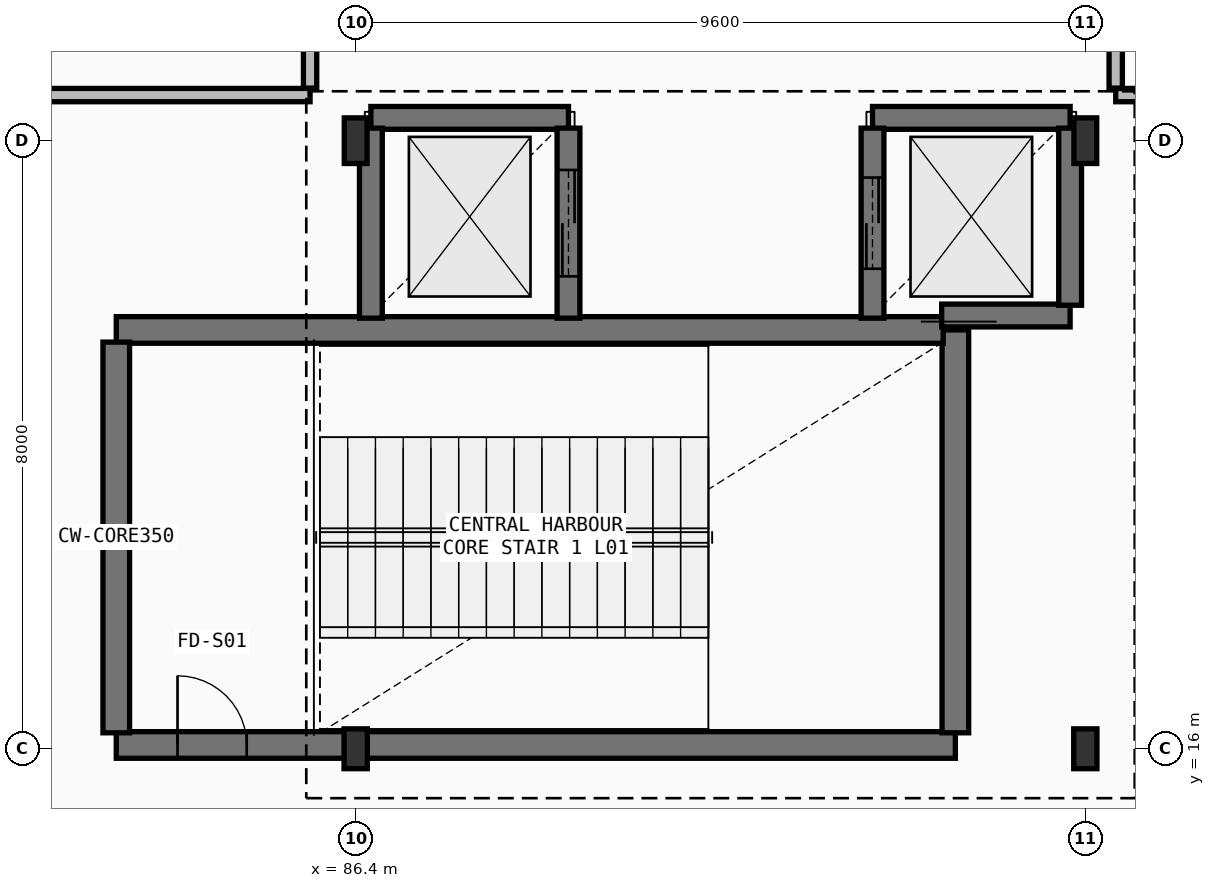
"""IFC4 building model, lengths in metres.
Left out: names, types, materials, properties, quantities, classifications, styles, units other than length and angle.
Written with IfcOpenShell. Run it as: python <this file> out.ifc"""

import sys

from ifc_helpers import new_model, si_unit, direction, frame, frame_2d, origin, origin_2d, place, context, subcontext, project, spatial, rectangle, i_section, extrude, element, fill, save


model = new_model("IFC4")
c1 = context("Model", 3, precision=1e-05, world=origin(), true_north=direction((0.0, 1.0)))
c2 = subcontext(c1, "Body", "Model", "MODEL_VIEW")
j1 = project(units=[si_unit("LENGTHUNIT", "METRE"), si_unit("PLANEANGLEUNIT", "RADIAN")], contexts=[c1])
p1 = place(None, origin())
s1 = spatial("IfcSite", under=j1, at=p1, CompositionType="ELEMENT")
p2 = place(p1, origin())
s2 = spatial("IfcBuilding", under=s1, at=p2, CompositionType="ELEMENT")
p3 = place(p2, frame((0.0, 0.0, 6.0)))
s3 = spatial("IfcBuildingStorey", under=s2, at=p3, CompositionType="ELEMENT", Elevation=6.0)
p4 = place(p3, frame((86.4, 16.0, 0.0), z_axis=(0.0, 0.0, 1.0), x_axis=(1.0, 0.0, 0.0)))
e1 = element("IfcColumn", 1, at=p4, inside=s3, PredefinedType="COLUMN", context=c2, shape_type="SweptSolid", body=[
    extrude(i_section(OverallWidth=0.306, OverallDepth=0.524, WebThickness=0.021, FlangeThickness=0.04, FilletRadius=0.027, at=origin_2d()), origin(), (0.0, 0.0, 1.0), 5.4),
])
p5 = place(p3, frame((86.4, 24.0, 0.0), z_axis=(0.0, 0.0, 1.0), x_axis=(1.0, 0.0, 0.0)))
e2 = element("IfcColumn", 2, at=p5, inside=s3, PredefinedType="COLUMN", context=c2, shape_type="SweptSolid", body=[
    extrude(i_section(OverallWidth=0.3, OverallDepth=0.6, WebThickness=0.015, FlangeThickness=0.03, FilletRadius=0.027, at=origin_2d()), origin(), (0.0, 0.0, 1.0), 5.4),
])
p6 = place(p3, frame((96.0, 16.0, 0.0), z_axis=(0.0, 0.0, 1.0), x_axis=(1.0, 0.0, 0.0)))
e3 = element("IfcColumn", 3, at=p6, inside=s3, PredefinedType="COLUMN", context=c2, shape_type="SweptSolid", body=[
    extrude(i_section(OverallWidth=0.306, OverallDepth=0.524, WebThickness=0.021, FlangeThickness=0.04, FilletRadius=0.027, at=origin_2d()), origin(), (0.0, 0.0, 1.0), 5.4),
])
p7 = place(p3, frame((96.0, 24.0, 0.0), z_axis=(0.0, 0.0, 1.0), x_axis=(1.0, 0.0, 0.0)))
e4 = element("IfcColumn", 4, at=p7, inside=s3, PredefinedType="COLUMN", context=c2, shape_type="SweptSolid", body=[
    extrude(i_section(OverallWidth=0.3, OverallDepth=0.6, WebThickness=0.015, FlangeThickness=0.03, FilletRadius=0.027, at=origin_2d()), origin(), (0.0, 0.0, 1.0), 5.4),
])
p8 = place(p3, frame((83.25, 16.05, 0.0), z_axis=(0.0, 0.0, 1.0), x_axis=(1.0, 0.0, 0.0)))
e5 = element("IfcWall", 5, at=p8, inside=s3, PredefinedType="SHEAR", context=c2, shape_type="SweptSolid", body=[
    extrude(rectangle(XDim=11.04, YDim=0.35, at=frame_2d((5.52, 0.0))), origin(), (0.0, 0.0, 1.0), 5.15),
])
p9 = place(p8, frame((0.806, 0.0, 0.0)))
e6 = element("IfcOpeningElement", 6, at=p9, cuts=e5, PredefinedType="OPENING", context=c2, shape_type="SweptSolid", body=[
    extrude(rectangle(XDim=0.91, YDim=2.08, at=frame_2d((0.455, 1.04))), frame((0.0, 0.185, 0.0), z_axis=(0.0, -1.0, 0.0), x_axis=(1.0, 0.0, 0.0)), (0.0, 0.0, 1.0), 0.37),
])
p10 = place(p3, frame((94.29, 16.21, 0.0), z_axis=(0.0, 0.0, 1.0), x_axis=(0.0, 1.0, 0.0)))
e7 = element("IfcWall", 7, at=p10, inside=s3, PredefinedType="SHEAR", context=c2, shape_type="SweptSolid", body=[
    extrude(rectangle(XDim=5.3, YDim=0.35, at=frame_2d((2.65, 0.0))), origin(), (0.0, 0.0, 1.0), 5.15),
])
p11 = place(p3, frame((94.13, 21.51, 0.0), z_axis=(0.0, 0.0, 1.0), x_axis=(-1.0, 0.0, 0.0)))
e8 = element("IfcWall", 8, at=p11, inside=s3, PredefinedType="SHEAR", context=c2, shape_type="SweptSolid", body=[
    extrude(rectangle(XDim=10.88, YDim=0.35, at=frame_2d((5.44, 0.0))), origin(), (0.0, 0.0, 1.0), 5.15),
])
p12 = place(p3, frame((83.25, 21.35, 0.0), z_axis=(0.0, 0.0, 1.0), x_axis=(0.0, -1.0, 0.0)))
e9 = element("IfcWall", 9, at=p12, inside=s3, PredefinedType="SHEAR", context=c2, shape_type="SweptSolid", body=[
    extrude(rectangle(XDim=5.14, YDim=0.35, at=frame_2d((2.57, 0.0))), origin(), (0.0, 0.0, 1.0), 5.15),
])
p13 = place(p3, frame((89.2, 24.3, 0.0), z_axis=(0.0, 0.0, 1.0), x_axis=(-1.0, 0.0, 0.0)))
e10 = element("IfcWall", 10, at=p13, inside=s3, PredefinedType="SHEAR", context=c2, shape_type="SweptSolid", body=[
    extrude(rectangle(XDim=2.6, YDim=0.3, at=frame_2d((1.3, 0.0))), origin(), (0.0, 0.0, 1.0), 5.15),
])
p14 = place(p3, frame((89.2, 21.665, 0.0), z_axis=(0.0, 0.0, 1.0), x_axis=(0.0, 1.0, 0.0)))
e11 = element("IfcWall", 11, at=p14, inside=s3, PredefinedType="SHEAR", context=c2, shape_type="SweptSolid", body=[
    extrude(rectangle(XDim=2.5, YDim=0.3, at=frame_2d((1.25, 0.0))), origin(), (0.0, 0.0, 1.0), 5.15),
])
p15 = place(p14, frame((0.55, 0.0, 0.0)))
e12 = element("IfcOpeningElement", 12, at=p15, cuts=e11, PredefinedType="OPENING", context=c2, shape_type="SweptSolid", body=[
    extrude(rectangle(XDim=1.4, YDim=2.26, at=frame_2d((0.7, 1.13))), frame((0.0, 0.16, 0.0), z_axis=(0.0, -1.0, 0.0), x_axis=(1.0, 0.0, 0.0)), (0.0, 0.0, 1.0), 0.32),
])
p16 = place(p3, frame((86.6, 24.165, 0.0), z_axis=(0.0, 0.0, 1.0), x_axis=(0.0, -1.0, 0.0)))
e13 = element("IfcWall", 13, at=p16, inside=s3, PredefinedType="SHEAR", context=c2, shape_type="SweptSolid", body=[
    extrude(rectangle(XDim=2.5, YDim=0.3, at=frame_2d((1.25, 0.0))), origin(), (0.0, 0.0, 1.0), 5.15),
])
p17 = place(p3, frame((95.8, 24.3, 0.0), z_axis=(0.0, 0.0, 1.0), x_axis=(-1.0, 0.0, 0.0)))
e14 = element("IfcWall", 14, at=p17, inside=s3, PredefinedType="SHEAR", context=c2, shape_type="SweptSolid", body=[
    extrude(rectangle(XDim=2.6, YDim=0.3, at=frame_2d((1.3, 0.0))), origin(), (0.0, 0.0, 1.0), 5.15),
])
p18 = place(p3, frame((94.11, 21.7, 0.0), z_axis=(0.0, 0.0, 1.0), x_axis=(1.0, 0.0, 0.0)))
e15 = element("IfcWall", 15, at=p18, inside=s3, PredefinedType="SHEAR", context=c2, shape_type="SweptSolid", body=[
    extrude(rectangle(XDim=1.69, YDim=0.3, at=frame_2d((0.845, 0.0))), origin(), (0.0, 0.0, 1.0), 5.15),
])
p19 = place(p3, frame((95.8, 21.835, 0.0), z_axis=(0.0, 0.0, 1.0), x_axis=(0.0, 1.0, 0.0)))
e16 = element("IfcWall", 16, at=p19, inside=s3, PredefinedType="SHEAR", context=c2, shape_type="SweptSolid", body=[
    extrude(rectangle(XDim=2.33, YDim=0.3, at=frame_2d((1.165, 0.0))), origin(), (0.0, 0.0, 1.0), 5.15),
])
p20 = place(p3, frame((93.2, 24.165, 0.0), z_axis=(0.0, 0.0, 1.0), x_axis=(0.0, -1.0, 0.0)))
e17 = element("IfcWall", 17, at=p20, inside=s3, PredefinedType="SHEAR", context=c2, shape_type="SweptSolid", body=[
    extrude(rectangle(XDim=2.5, YDim=0.3, at=frame_2d((1.25, 0.0))), origin(), (0.0, 0.0, 1.0), 5.15),
])
p21 = place(p20, frame((0.65, 0.0, 0.0)))
e18 = element("IfcOpeningElement", 18, at=p21, cuts=e17, PredefinedType="OPENING", context=c2, shape_type="SweptSolid", body=[
    extrude(rectangle(XDim=1.2, YDim=2.2, at=frame_2d((0.6, 1.1))), frame((0.0, 0.16, 0.0), z_axis=(0.0, -1.0, 0.0), x_axis=(1.0, 0.0, 0.0)), (0.0, 0.0, 1.0), 0.32),
])
p22 = place(p3, frame((67.6, 24.6, 0.0), z_axis=(0.0, 0.0, 1.0), x_axis=(1.0, 0.0, 0.0)))
e19 = element("IfcWall", 19, at=p22, inside=s3, PredefinedType="PARTITIONING", context=c2, shape_type="SweptSolid", body=[
    extrude(rectangle(XDim=18.2, YDim=0.175, at=frame_2d((9.1, 0.0))), origin(), (0.0, 0.0, 1.0), 4.52),
])
p23 = place(p22, frame((5.768, 0.0, 0.0)))
e20 = element("IfcOpeningElement", 20, at=p23, cuts=e19, PredefinedType="OPENING", context=c2, shape_type="SweptSolid", body=[
    extrude(rectangle(XDim=1.72, YDim=2.24, at=frame_2d((0.86, 1.12))), frame((0.0, 0.097, 0.0), z_axis=(0.0, -1.0, 0.0), x_axis=(1.0, 0.0, 0.0)), (0.0, 0.0, 1.0), 0.195),
])
p24 = place(p22, frame((13.322, 0.0, 0.0)))
e21 = element("IfcOpeningElement", 21, at=p24, cuts=e19, PredefinedType="OPENING", context=c2, shape_type="SweptSolid", body=[
    extrude(rectangle(XDim=1.12, YDim=2.2, at=frame_2d((0.56, 1.1))), frame((0.0, 0.097, 0.0), z_axis=(0.0, -1.0, 0.0), x_axis=(1.0, 0.0, 0.0)), (0.0, 0.0, 1.0), 0.195),
])
p25 = place(p3, frame((85.8, 24.691, 0.0), z_axis=(0.0, 0.0, 1.0), x_axis=(0.0, 1.0, 0.0)))
e22 = element("IfcWall", 22, at=p25, inside=s3, PredefinedType="PARTITIONING", context=c2, shape_type="SweptSolid", body=[
    extrude(rectangle(XDim=14.708, YDim=0.175, at=frame_2d((7.354, 0.0))), origin(), (0.0, 0.0, 1.0), 4.57),
])
p26 = place(p3, frame((96.4, 24.6, 0.0), z_axis=(0.0, 0.0, 1.0), x_axis=(1.0, 0.0, 0.0)))
e23 = element("IfcWall", 23, at=p26, inside=s3, PredefinedType="PARTITIONING", context=c2, shape_type="SweptSolid", body=[
    extrude(rectangle(XDim=18.2, YDim=0.175, at=frame_2d((9.1, 0.0))), origin(), (0.0, 0.0, 1.0), 4.57),
])
p27 = place(p26, frame((5.733, 0.0, 0.0)))
e24 = element("IfcOpeningElement", 24, at=p27, cuts=e23, PredefinedType="OPENING", context=c2, shape_type="SweptSolid", body=[
    extrude(rectangle(XDim=1.82, YDim=2.26, at=frame_2d((0.91, 1.13))), frame((0.0, 0.097, 0.0), z_axis=(0.0, -1.0, 0.0), x_axis=(1.0, 0.0, 0.0)), (0.0, 0.0, 1.0), 0.195),
])
p28 = place(p26, frame((13.478, 0.0, 0.0)))
e25 = element("IfcOpeningElement", 25, at=p28, cuts=e23, PredefinedType="OPENING", context=c2, shape_type="SweptSolid", body=[
    extrude(rectangle(XDim=0.92, YDim=2.15, at=frame_2d((0.46, 1.075))), frame((0.0, 0.097, 0.0), z_axis=(0.0, -1.0, 0.0), x_axis=(1.0, 0.0, 0.0)), (0.0, 0.0, 1.0), 0.195),
])
p29 = place(p3, frame((96.4, 39.309, 0.0), z_axis=(0.0, 0.0, 1.0), x_axis=(0.0, -1.0, 0.0)))
e26 = element("IfcWall", 26, at=p29, inside=s3, PredefinedType="PARTITIONING", context=c2, shape_type="SweptSolid", body=[
    extrude(rectangle(XDim=14.617, YDim=0.175, at=frame_2d((7.309, 0.0))), origin(), (0.0, 0.0, 1.0), 4.67),
])
p30 = place(p9, origin())
e27 = element("IfcDoor", 27, at=p30, inside=s3, OperationType="SINGLE_SWING_LEFT", PredefinedType="DOOR", context=c2, shape_type="SweptSolid", body=[
    extrude(rectangle(XDim=0.91, YDim=2.08, at=frame_2d((0.455, 1.04))), frame((0.0, 0.025, 0.0), z_axis=(0.0, -1.0, 0.0), x_axis=(1.0, 0.0, 0.0)), (0.0, 0.0, 1.0), 0.05),
])
fill(e6, e27)
p31 = place(p15, origin())
e28 = element("IfcDoor", 28, at=p31, inside=s3, OperationType="DOUBLE_DOOR_SLIDING", PredefinedType="DOOR", context=c2, shape_type="SweptSolid", body=[
    extrude(rectangle(XDim=1.4, YDim=2.26, at=frame_2d((0.7, 1.13))), frame((0.0, 0.025, 0.0), z_axis=(0.0, -1.0, 0.0), x_axis=(1.0, 0.0, 0.0)), (0.0, 0.0, 1.0), 0.05),
])
fill(e12, e28)
p32 = place(p21, origin())
e29 = element("IfcDoor", 29, at=p32, inside=s3, OperationType="DOUBLE_DOOR_SLIDING", PredefinedType="DOOR", context=c2, shape_type="SweptSolid", body=[
    extrude(rectangle(XDim=1.2, YDim=2.2, at=frame_2d((0.6, 1.1))), frame((0.0, 0.025, 0.0), z_axis=(0.0, -1.0, 0.0), x_axis=(1.0, 0.0, 0.0)), (0.0, 0.0, 1.0), 0.05),
])
fill(e18, e29)
save(model, sys.argv[1])
